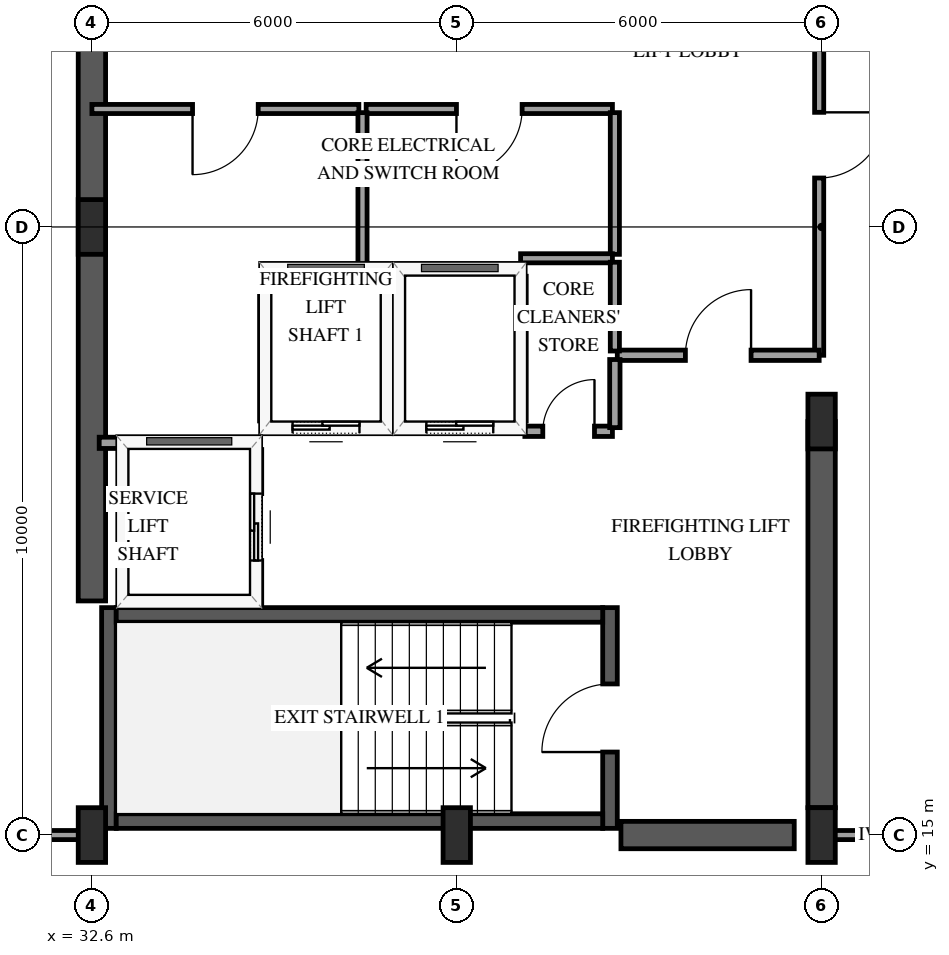
"""IFC4 building model, lengths in metres.
Left out: names, types, materials, properties, quantities, classifications, styles, units other than length and angle.
Written with IfcOpenShell. Run it as: python <this file> out.ifc"""

import sys

from ifc_helpers import new_model, si_unit, direction, frame, frame_2d, origin, origin_2d, place, context, subcontext, project, spatial, rectangle, extrude, element, fill, save


model = new_model("IFC4")
c1 = context("Model", 3, precision=1e-05, world=origin(), true_north=direction((0.0, 1.0)))
c2 = subcontext(c1, "Body", "Model", "MODEL_VIEW")
j1 = project(units=[si_unit("LENGTHUNIT", "METRE"), si_unit("PLANEANGLEUNIT", "RADIAN")], contexts=[c1])
p1 = place(None, origin())
s1 = spatial("IfcSite", under=j1, at=p1, CompositionType="ELEMENT")
p2 = place(p1, origin())
s2 = spatial("IfcBuilding", under=s1, at=p2, CompositionType="ELEMENT")
p3 = place(p2, frame((0.0, 0.0, 265.0)))
s3 = spatial("IfcBuildingStorey", under=s2, at=p3, CompositionType="ELEMENT", Elevation=265.0)
p4 = place(p3, frame((32.88, 15.11, 0.0), z_axis=(0.0, 0.0, 1.0), x_axis=(0.0, 1.0, 0.0)))
e1 = element("IfcWall", 1, at=p4, inside=s3, PredefinedType="SHEAR", context=c2, shape_type="SweptSolid", body=[
    extrude(rectangle(XDim=3.63, YDim=0.24, at=frame_2d((1.815, 0.0))), origin(), (0.0, 0.0, 1.0), 3.75),
])
p5 = place(p3, frame((41.12, 15.11, 0.0), z_axis=(0.0, 0.0, 1.0), x_axis=(0.0, 1.0, 0.0)))
e2 = element("IfcWall", 2, at=p5, inside=s3, PredefinedType="SHEAR", context=c2, shape_type="SweptSolid", body=[
    extrude(rectangle(XDim=3.63, YDim=0.24, at=frame_2d((1.815, 0.0))), origin(), (0.0, 0.0, 1.0), 3.75),
])
p6 = place(p5, frame((1.255, 0.0, 0.0)))
e3 = element("IfcOpeningElement", 3, at=p6, cuts=e2, PredefinedType="OPENING", context=c2, shape_type="SweptSolid", body=[
    extrude(rectangle(XDim=1.12, YDim=2.15, at=frame_2d((0.56, 1.075))), frame((0.0, 0.13, 0.0), z_axis=(0.0, -1.0, 0.0), x_axis=(1.0, 0.0, 0.0)), (0.0, 0.0, 1.0), 0.26),
])
for number, where, z_axis, x_axis in (
    (4, (33.0, 15.23, 0.0), (0.0, 0.0, 1.0), (1.0, 0.0, 0.0)),
    (5, (33.0, 18.62, 0.0), (0.0, 0.0, 1.0), (1.0, 0.0, 0.0)),
):
    element("IfcWall", number, at=place(p3, frame(where, z_axis=z_axis, x_axis=x_axis)), inside=s3, PredefinedType="SHEAR", context=c2, shape_type="SweptSolid", body=[
        extrude(rectangle(XDim=8.0, YDim=0.24, at=frame_2d((4.0, 0.0))), origin(), (0.0, 0.0, 1.0), 3.75),
    ])
p7 = place(p3, frame((32.6, 18.85, 0.0), z_axis=(0.0, 0.0, 1.0), x_axis=(0.0, 1.0, 0.0)))
e6 = element("IfcWall", 6, at=p7, inside=s3, PredefinedType="SHEAR", context=c2, shape_type="SweptSolid", body=[
    extrude(rectangle(XDim=12.3, YDim=0.45, at=frame_2d((6.15, 0.0))), origin(), (0.0, 0.0, 1.0), 3.75),
])
p8 = place(p3, frame((41.3, 15.0, 0.0), z_axis=(0.0, 0.0, 1.0), x_axis=(1.0, 0.0, 0.0)))
e7 = element("IfcWall", 7, at=p8, inside=s3, PredefinedType="SHEAR", context=c2, shape_type="SweptSolid", body=[
    extrude(rectangle(XDim=2.85, YDim=0.45, at=frame_2d((1.425, 0.0))), origin(), (0.0, 0.0, 1.0), 3.75),
])
p9 = place(p3, frame((44.6, 15.45, 0.0), z_axis=(0.0, 0.0, 1.0), x_axis=(0.0, 1.0, 0.0)))
e8 = element("IfcWall", 8, at=p9, inside=s3, PredefinedType="SHEAR", context=c2, shape_type="SweptSolid", body=[
    extrude(rectangle(XDim=6.35, YDim=0.45, at=frame_2d((3.175, 0.0))), origin(), (0.0, 0.0, 1.0), 3.75),
])
for number, where, z_axis, x_axis in (
    (9, (32.6, 15.0, 0.0), (0.0, 0.0, 1.0), (1.0, 0.0, 0.0)),
    (10, (32.6, 25.0, 0.0), (0.0, 0.0, 1.0), (1.0, 0.0, 0.0)),
    (11, (38.6, 15.0, 0.0), (0.0, 0.0, 1.0), (1.0, 0.0, 0.0)),
    (12, (44.6, 15.0, 0.0), (0.0, 0.0, 1.0), (1.0, 0.0, 0.0)),
    (13, (44.6, 21.8, 0.0), (0.0, 0.0, 1.0), (1.0, 0.0, 0.0)),
):
    element("IfcColumn", number, at=place(p3, frame(where, z_axis=z_axis, x_axis=x_axis)), inside=s3, PredefinedType="PILASTER", context=c2, shape_type="SweptSolid", body=[
        extrude(rectangle(XDim=0.45, YDim=0.9, at=origin_2d()), origin(), (0.0, 0.0, 1.0), 3.75),
    ])
p10 = place(p3, frame((35.45, 21.7, 0.0), z_axis=(0.0, 0.0, 1.0), x_axis=(1.0, 0.0, 0.0)))
e14 = element("IfcWall", 14, at=p10, inside=s3, PredefinedType="SOLIDWALL", context=c2, shape_type="SweptSolid", body=[
    extrude(rectangle(XDim=2.0, YDim=0.185, at=frame_2d((1.0, 0.0))), origin(), (0.0, 0.0, 1.0), 3.45),
])
p11 = place(p10, frame((0.45, 0.0, 0.0)))
e15 = element("IfcOpeningElement", 15, at=p11, cuts=e14, PredefinedType="OPENING", context=c2, shape_type="SweptSolid", body=[
    extrude(rectangle(XDim=1.1, YDim=2.15, at=frame_2d((0.55, 1.075))), frame((0.0, 0.103, 0.0), z_axis=(0.0, -1.0, 0.0), x_axis=(1.0, 0.0, 0.0)), (0.0, 0.0, 1.0), 0.205),
])
p12 = place(p3, frame((35.45, 24.3, 0.0), z_axis=(0.0, 0.0, 1.0), x_axis=(1.0, 0.0, 0.0)))
e16 = element("IfcWall", 16, at=p12, inside=s3, PredefinedType="SOLIDWALL", context=c2, shape_type="SweptSolid", body=[
    extrude(rectangle(XDim=2.0, YDim=0.185, at=frame_2d((1.0, 0.0))), origin(), (0.0, 0.0, 1.0), 3.45),
])
for number, where, z_axis, x_axis in (
    (17, (35.45, 21.81, 0.0), (0.0, 0.0, 1.0), (0.0, 1.0, 0.0)),
    (18, (37.45, 21.81, 0.0), (0.0, 0.0, 1.0), (0.0, 1.0, 0.0)),
):
    element("IfcWall", number, at=place(p3, frame(where, z_axis=z_axis, x_axis=x_axis)), inside=s3, PredefinedType="SOLIDWALL", context=c2, shape_type="SweptSolid", body=[
        extrude(rectangle(XDim=2.38, YDim=0.185, at=frame_2d((1.19, 0.0))), origin(), (0.0, 0.0, 1.0), 3.45),
    ])
p13 = place(p3, frame((37.65, 21.7, 0.0), z_axis=(0.0, 0.0, 1.0), x_axis=(1.0, 0.0, 0.0)))
e19 = element("IfcWall", 19, at=p13, inside=s3, PredefinedType="SOLIDWALL", context=c2, shape_type="SweptSolid", body=[
    extrude(rectangle(XDim=2.0, YDim=0.185, at=frame_2d((1.0, 0.0))), origin(), (0.0, 0.0, 1.0), 3.45),
])
p14 = place(p13, frame((0.45, 0.0, 0.0)))
e20 = element("IfcOpeningElement", 20, at=p14, cuts=e19, PredefinedType="OPENING", context=c2, shape_type="SweptSolid", body=[
    extrude(rectangle(XDim=1.1, YDim=2.15, at=frame_2d((0.55, 1.075))), frame((0.0, 0.103, 0.0), z_axis=(0.0, -1.0, 0.0), x_axis=(1.0, 0.0, 0.0)), (0.0, 0.0, 1.0), 0.205),
])
p15 = place(p3, frame((37.65, 24.3, 0.0), z_axis=(0.0, 0.0, 1.0), x_axis=(1.0, 0.0, 0.0)))
e21 = element("IfcWall", 21, at=p15, inside=s3, PredefinedType="SOLIDWALL", context=c2, shape_type="SweptSolid", body=[
    extrude(rectangle(XDim=2.0, YDim=0.185, at=frame_2d((1.0, 0.0))), origin(), (0.0, 0.0, 1.0), 3.45),
])
p16 = place(p3, frame((39.65, 21.81, 0.0), z_axis=(0.0, 0.0, 1.0), x_axis=(0.0, 1.0, 0.0)))
e22 = element("IfcWall", 22, at=p16, inside=s3, PredefinedType="SOLIDWALL", context=c2, shape_type="SweptSolid", body=[
    extrude(rectangle(XDim=2.38, YDim=0.185, at=frame_2d((1.19, 0.0))), origin(), (0.0, 0.0, 1.0), 3.45),
])
p17 = place(p3, frame((32.72, 21.45, 0.0), z_axis=(0.0, 0.0, 1.0), x_axis=(1.0, 0.0, 0.0)))
e23 = element("IfcWall", 23, at=p17, inside=s3, PredefinedType="SOLIDWALL", context=c2, shape_type="SweptSolid", body=[
    extrude(rectangle(XDim=2.58, YDim=0.185, at=frame_2d((1.29, 0.0))), origin(), (0.0, 0.0, 1.0), 3.45),
])
p18 = place(p3, frame((35.3, 18.79, 0.0), z_axis=(0.0, 0.0, 1.0), x_axis=(0.0, 1.0, 0.0)))
e24 = element("IfcWall", 24, at=p18, inside=s3, PredefinedType="SOLIDWALL", context=c2, shape_type="SweptSolid", body=[
    extrude(rectangle(XDim=2.55, YDim=0.185, at=frame_2d((1.275, 0.0))), origin(), (0.0, 0.0, 1.0), 3.45),
])
p19 = place(p18, frame((0.725, 0.0, 0.0)))
e25 = element("IfcOpeningElement", 25, at=p19, cuts=e24, PredefinedType="OPENING", context=c2, shape_type="SweptSolid", body=[
    extrude(rectangle(XDim=1.1, YDim=2.15, at=frame_2d((0.55, 1.075))), frame((0.0, 0.103, 0.0), z_axis=(0.0, -1.0, 0.0), x_axis=(1.0, 0.0, 0.0)), (0.0, 0.0, 1.0), 0.205),
])
p20 = place(p3, frame((44.56, 29.8, 0.0), z_axis=(0.0, 0.0, 1.0), x_axis=(0.0, -1.0, 0.0)))
e26 = element("IfcWall", 26, at=p20, inside=s3, PredefinedType="PARTITIONING", context=c2, shape_type="SweptSolid", body=[
    extrude(rectangle(XDim=6.91, YDim=0.15, at=frame_2d((3.455, 0.0))), origin(), (0.0, 0.0, 1.0), 2.49),
])
p21 = place(p20, frame((2.915, 0.0, 0.0)))
e27 = element("IfcOpeningElement", 27, at=p21, cuts=e26, PredefinedType="OPENING", context=c2, shape_type="SweptSolid", body=[
    extrude(rectangle(XDim=1.08, YDim=2.15, at=frame_2d((0.54, 1.075))), frame((0.0, 0.085, 0.0), z_axis=(0.0, -1.0, 0.0), x_axis=(1.0, 0.0, 0.0)), (0.0, 0.0, 1.0), 0.17),
])
p22 = place(p3, frame((36.99, 26.94, 0.0), z_axis=(0.0, 0.0, 1.0), x_axis=(-1.0, 0.0, 0.0)))
e28 = element("IfcWall", 28, at=p22, inside=s3, PredefinedType="PARTITIONING", context=c2, shape_type="SweptSolid", body=[
    extrude(rectangle(XDim=4.39, YDim=0.15, at=frame_2d((2.195, 0.0))), origin(), (0.0, 0.0, 1.0), 3.45),
])
p23 = place(p22, frame((1.655, 0.0, 0.0)))
e29 = element("IfcOpeningElement", 29, at=p23, cuts=e28, PredefinedType="OPENING", context=c2, shape_type="SweptSolid", body=[
    extrude(rectangle(XDim=1.08, YDim=2.15, at=frame_2d((0.54, 1.075))), frame((0.0, 0.085, 0.0), z_axis=(0.0, -1.0, 0.0), x_axis=(1.0, 0.0, 0.0)), (0.0, 0.0, 1.0), 0.17),
])
p24 = place(p3, frame((41.16, 26.94, 0.0), z_axis=(0.0, 0.0, 1.0), x_axis=(-1.0, 0.0, 0.0)))
e30 = element("IfcWall", 30, at=p24, inside=s3, PredefinedType="PARTITIONING", context=c2, shape_type="SweptSolid", body=[
    extrude(rectangle(XDim=4.05, YDim=0.15, at=frame_2d((2.025, 0.0))), origin(), (0.0, 0.0, 1.0), 3.45),
])
p25 = place(p24, frame((1.485, 0.0, 0.0)))
e31 = element("IfcOpeningElement", 31, at=p25, cuts=e30, PredefinedType="OPENING", context=c2, shape_type="SweptSolid", body=[
    extrude(rectangle(XDim=1.08, YDim=2.15, at=frame_2d((0.54, 1.075))), frame((0.0, 0.085, 0.0), z_axis=(0.0, -1.0, 0.0), x_axis=(1.0, 0.0, 0.0)), (0.0, 0.0, 1.0), 0.17),
])
p26 = place(p3, frame((41.24, 22.89, 0.0), z_axis=(0.0, 0.0, 1.0), x_axis=(1.0, 0.0, 0.0)))
e32 = element("IfcWall", 32, at=p26, inside=s3, PredefinedType="PARTITIONING", context=c2, shape_type="SweptSolid", body=[
    extrude(rectangle(XDim=3.32, YDim=0.17, at=frame_2d((1.66, 0.0))), origin(), (0.0, 0.0, 1.0), 2.824),
])
p27 = place(p26, frame((1.12, 0.0, 0.0)))
e33 = element("IfcOpeningElement", 33, at=p27, cuts=e32, PredefinedType="OPENING", context=c2, shape_type="SweptSolid", body=[
    extrude(rectangle(XDim=1.08, YDim=2.15, at=frame_2d((0.54, 1.075))), frame((0.0, 0.095, 0.0), z_axis=(0.0, -1.0, 0.0), x_axis=(1.0, 0.0, 0.0)), (0.0, 0.0, 1.0), 0.19),
])
p28 = place(p3, frame((32.53, 15.0, 0.0), z_axis=(0.0, 0.0, 1.0), x_axis=(-1.0, 0.0, 0.0)))
e34 = element("IfcWall", 34, at=p28, inside=s3, PredefinedType="PARTITIONING", context=c2, shape_type="SweptSolid", body=[
    extrude(rectangle(XDim=2.838, YDim=0.15, at=frame_2d((1.419, 0.0))), origin(), (0.0, 0.0, 1.0), 3.45),
])
p29 = place(p3, frame((37.05, 26.88, 0.0), z_axis=(0.0, 0.0, 1.0), x_axis=(0.0, -1.0, 0.0)))
e35 = element("IfcWall", 35, at=p29, inside=s3, PredefinedType="PARTITIONING", context=c2, shape_type="SweptSolid", body=[
    extrude(rectangle(XDim=2.58, YDim=0.15, at=frame_2d((1.29, 0.0))), origin(), (0.0, 0.0, 1.0), 3.45),
])
p30 = place(p3, frame((41.2, 24.55, 0.0), z_axis=(0.0, 0.0, 1.0), x_axis=(0.0, 1.0, 0.0)))
e36 = element("IfcWall", 36, at=p30, inside=s3, PredefinedType="PARTITIONING", context=c2, shape_type="SweptSolid", body=[
    extrude(rectangle(XDim=2.33, YDim=0.15, at=frame_2d((1.165, 0.0))), origin(), (0.0, 0.0, 1.0), 3.45),
])
p31 = place(p3, frame((46.58, 15.0, 0.0), z_axis=(0.0, 0.0, 1.0), x_axis=(-1.0, 0.0, 0.0)))
e37 = element("IfcWall", 37, at=p31, inside=s3, PredefinedType="PARTITIONING", context=c2, shape_type="SweptSolid", body=[
    extrude(rectangle(XDim=1.91, YDim=0.15, at=frame_2d((0.955, 0.0))), origin(), (0.0, 0.0, 1.0), 3.45),
])
p32 = place(p3, frame((39.65, 24.485, 0.0), z_axis=(0.0, 0.0, 1.0), x_axis=(1.0, 0.0, 0.0)))
e38 = element("IfcWall", 38, at=p32, inside=s3, PredefinedType="PARTITIONING", context=c2, shape_type="SweptSolid", body=[
    extrude(rectangle(XDim=1.51, YDim=0.15, at=frame_2d((0.755, 0.0))), origin(), (0.0, 0.0, 1.0), 3.45),
])
p33 = place(p3, frame((41.2, 22.96, 0.0), z_axis=(0.0, 0.0, 1.0), x_axis=(0.0, 1.0, 0.0)))
e39 = element("IfcWall", 39, at=p33, inside=s3, PredefinedType="PARTITIONING", context=c2, shape_type="SweptSolid", body=[
    extrude(rectangle(XDim=1.46, YDim=0.15, at=frame_2d((0.73, 0.0))), origin(), (0.0, 0.0, 1.0), 3.45),
])
p34 = place(p3, frame((39.72, 21.64, 0.0), z_axis=(0.0, 0.0, 1.0), x_axis=(1.0, 0.0, 0.0)))
e40 = element("IfcWall", 40, at=p34, inside=s3, PredefinedType="PARTITIONING", context=c2, shape_type="SweptSolid", body=[
    extrude(rectangle(XDim=1.44, YDim=0.17, at=frame_2d((0.72, 0.0))), origin(), (0.0, 0.0, 1.0), 3.45),
])
p35 = place(p34, frame((0.295, 0.0, 0.0)))
e41 = element("IfcOpeningElement", 41, at=p35, cuts=e40, PredefinedType="OPENING", context=c2, shape_type="SweptSolid", body=[
    extrude(rectangle(XDim=0.85, YDim=2.1, at=frame_2d((0.425, 1.05))), frame((0.0, 0.095, 0.0), z_axis=(0.0, -1.0, 0.0), x_axis=(1.0, 0.0, 0.0)), (0.0, 0.0, 1.0), 0.19),
])
p36 = place(p3, frame((41.2, 21.7, 0.0), z_axis=(0.0, 0.0, 1.0), x_axis=(0.0, 1.0, 0.0)))
e42 = element("IfcWall", 42, at=p36, inside=s3, PredefinedType="PARTITIONING", context=c2, shape_type="SweptSolid", body=[
    extrude(rectangle(XDim=1.12, YDim=0.17, at=frame_2d((0.56, 0.0))), origin(), (0.0, 0.0, 1.0), 3.45),
])
p37 = place(p11, origin())
e43 = element("IfcDoor", 43, at=p37, inside=s3, OperationType="SLIDING_TO_LEFT", PredefinedType="DOOR", context=c2, shape_type="SweptSolid", body=[
    extrude(rectangle(XDim=1.1, YDim=2.15, at=frame_2d((0.55, 1.075))), frame((0.0, 0.025, 0.0), z_axis=(0.0, -1.0, 0.0), x_axis=(1.0, 0.0, 0.0)), (0.0, 0.0, 1.0), 0.05),
])
fill(e15, e43)
p38 = place(p14, origin())
e44 = element("IfcDoor", 44, at=p38, inside=s3, OperationType="SLIDING_TO_LEFT", PredefinedType="DOOR", context=c2, shape_type="SweptSolid", body=[
    extrude(rectangle(XDim=1.1, YDim=2.15, at=frame_2d((0.55, 1.075))), frame((0.0, 0.025, 0.0), z_axis=(0.0, -1.0, 0.0), x_axis=(1.0, 0.0, 0.0)), (0.0, 0.0, 1.0), 0.05),
])
fill(e20, e44)
p39 = place(p19, origin())
e45 = element("IfcDoor", 45, at=p39, inside=s3, OperationType="SLIDING_TO_LEFT", PredefinedType="DOOR", context=c2, shape_type="SweptSolid", body=[
    extrude(rectangle(XDim=1.1, YDim=2.15, at=frame_2d((0.55, 1.075))), frame((0.0, 0.025, 0.0), z_axis=(0.0, -1.0, 0.0), x_axis=(1.0, 0.0, 0.0)), (0.0, 0.0, 1.0), 0.05),
])
fill(e25, e45)
p40 = place(p6, origin())
e46 = element("IfcDoor", 46, at=p40, inside=s3, OperationType="SINGLE_SWING_LEFT", PredefinedType="DOOR", context=c2, shape_type="SweptSolid", body=[
    extrude(rectangle(XDim=1.12, YDim=2.15, at=frame_2d((0.56, 1.075))), frame((0.0, 0.025, 0.0), z_axis=(0.0, -1.0, 0.0), x_axis=(1.0, 0.0, 0.0)), (0.0, 0.0, 1.0), 0.05),
])
fill(e3, e46)
p41 = place(p21, origin())
e47 = element("IfcDoor", 47, at=p41, inside=s3, OperationType="SINGLE_SWING_LEFT", PredefinedType="DOOR", context=c2, shape_type="SweptSolid", body=[
    extrude(rectangle(XDim=1.08, YDim=2.15, at=frame_2d((0.54, 1.075))), frame((0.0, 0.025, 0.0), z_axis=(0.0, -1.0, 0.0), x_axis=(1.0, 0.0, 0.0)), (0.0, 0.0, 1.0), 0.05),
])
fill(e27, e47)
p42 = place(p23, origin())
e48 = element("IfcDoor", 48, at=p42, inside=s3, OperationType="SINGLE_SWING_RIGHT", PredefinedType="DOOR", context=c2, shape_type="SweptSolid", body=[
    extrude(rectangle(XDim=1.08, YDim=2.15, at=frame_2d((0.54, 1.075))), frame((0.0, 0.025, 0.0), z_axis=(0.0, -1.0, 0.0), x_axis=(1.0, 0.0, 0.0)), (0.0, 0.0, 1.0), 0.05),
])
fill(e29, e48)
p43 = place(p25, origin())
e49 = element("IfcDoor", 49, at=p43, inside=s3, OperationType="SINGLE_SWING_RIGHT", PredefinedType="DOOR", context=c2, shape_type="SweptSolid", body=[
    extrude(rectangle(XDim=1.08, YDim=2.15, at=frame_2d((0.54, 1.075))), frame((0.0, 0.025, 0.0), z_axis=(0.0, -1.0, 0.0), x_axis=(1.0, 0.0, 0.0)), (0.0, 0.0, 1.0), 0.05),
])
fill(e31, e49)
p44 = place(p27, origin())
e50 = element("IfcDoor", 50, at=p44, inside=s3, OperationType="SINGLE_SWING_RIGHT", PredefinedType="DOOR", context=c2, shape_type="SweptSolid", body=[
    extrude(rectangle(XDim=1.08, YDim=2.15, at=frame_2d((0.54, 1.075))), frame((0.0, 0.025, 0.0), z_axis=(0.0, -1.0, 0.0), x_axis=(1.0, 0.0, 0.0)), (0.0, 0.0, 1.0), 0.05),
])
fill(e33, e50)
p45 = place(p35, origin())
e51 = element("IfcDoor", 51, at=p45, inside=s3, OperationType="SINGLE_SWING_RIGHT", PredefinedType="DOOR", context=c2, shape_type="SweptSolid", body=[
    extrude(rectangle(XDim=0.85, YDim=2.1, at=frame_2d((0.425, 1.05))), frame((0.0, 0.025, 0.0), z_axis=(0.0, -1.0, 0.0), x_axis=(1.0, 0.0, 0.0)), (0.0, 0.0, 1.0), 0.05),
])
fill(e41, e51)
save(model, sys.argv[1])
